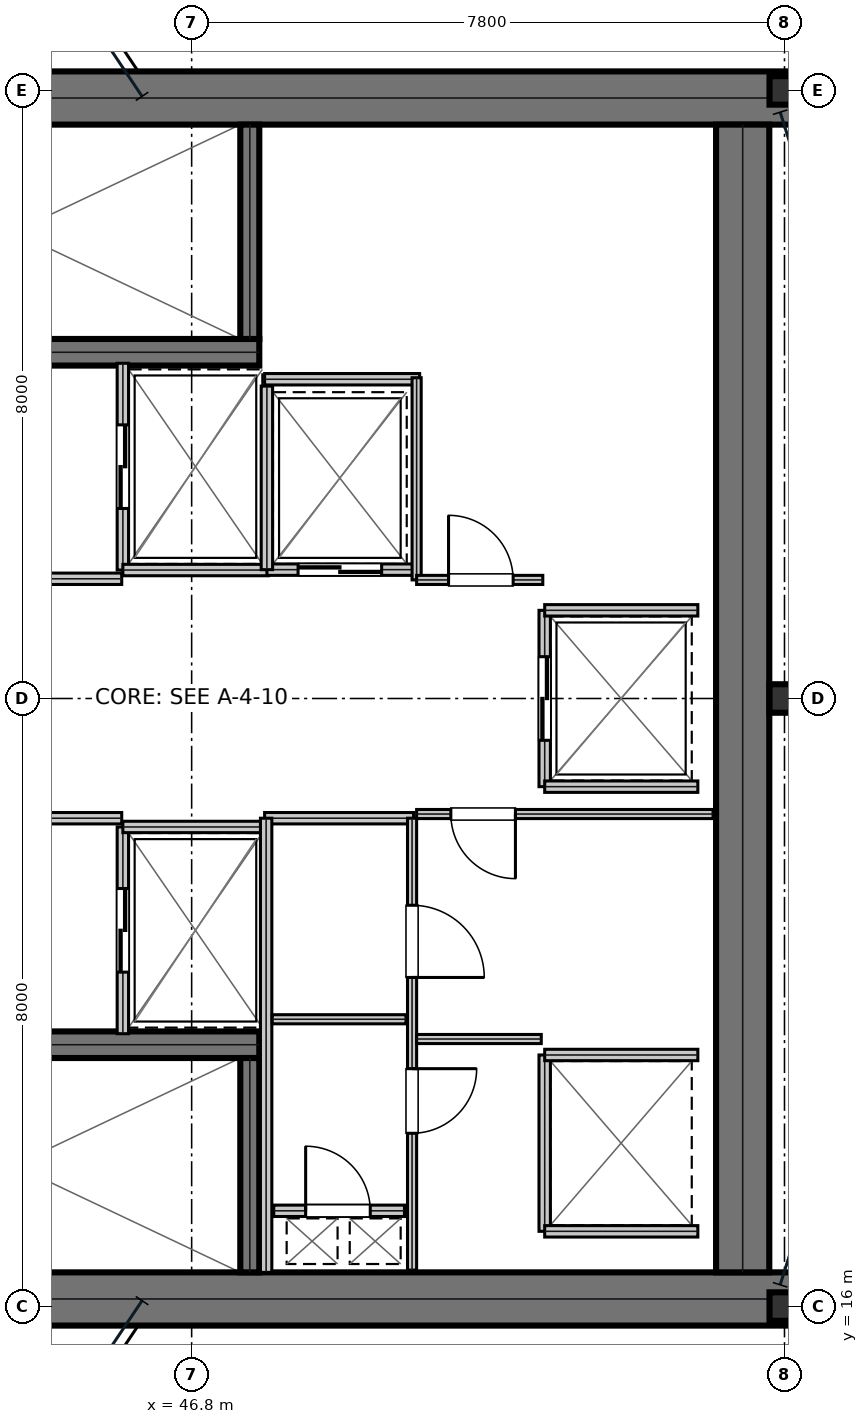
"""IFC4 building model, lengths in metres.
Left out: names, types, materials, properties, quantities, classifications, styles, units other than length and angle.
Written with IfcOpenShell. Run it as: python <this file> out.ifc"""

import sys

from ifc_helpers import new_model, si_unit, direction, frame, frame_2d, origin, origin_2d, place, context, subcontext, project, spatial, rectangle, i_section, extrude, element, fill, save


model = new_model("IFC4")
c1 = context("Model", 3, precision=1e-05, world=origin(), true_north=direction((0.0, 1.0)))
c2 = subcontext(c1, "Body", "Model", "MODEL_VIEW")
j1 = project(units=[si_unit("LENGTHUNIT", "METRE"), si_unit("PLANEANGLEUNIT", "RADIAN")], contexts=[c1])
p1 = place(None, origin())
s1 = spatial("IfcSite", under=j1, at=p1, CompositionType="ELEMENT")
p2 = place(p1, origin())
s2 = spatial("IfcBuilding", under=s1, at=p2, CompositionType="ELEMENT")
p3 = place(p2, frame((0.0, 0.0, 204.0)))
s3 = spatial("IfcBuildingStorey", under=s2, at=p3, CompositionType="ELEMENT", Elevation=204.0)
for number, where, z_axis, x_axis in (
    (1, (38.8, 31.9, 0.0), (0.0, 0.0, 1.0), (1.0, 0.0, 0.0)),
    (2, (38.8, 16.1, 0.0), (0.0, 0.0, 1.0), (1.0, 0.0, 0.0)),
):
    element("IfcWall", number, at=place(p3, frame(where, z_axis=z_axis, x_axis=x_axis)), inside=s3, PredefinedType="SHEAR", context=c2, shape_type="SweptSolid", body=[
        extrude(rectangle(XDim=16.0, YDim=0.7, at=frame_2d((8.0, 0.0))), origin(), (0.0, 0.0, 1.0), 3.79),
    ])
p4 = place(p3, frame((54.05, 16.45, 0.0), z_axis=(0.0, 0.0, 1.0), x_axis=(0.0, 1.0, 0.0)))
e3 = element("IfcWall", 3, at=p4, inside=s3, PredefinedType="SHEAR", context=c2, shape_type="SweptSolid", body=[
    extrude(rectangle(XDim=15.1, YDim=0.7, at=frame_2d((7.55, 0.0))), origin(), (0.0, 0.0, 1.0), 3.79),
])
p5 = place(p3, frame((39.98, 28.555, 0.0), z_axis=(0.0, 0.0, 1.0), x_axis=(1.0, 0.0, 0.0)))
e4 = element("IfcWall", 4, at=p5, inside=s3, PredefinedType="SHEAR", context=c2, shape_type="SweptSolid", body=[
    extrude(rectangle(XDim=7.71, YDim=0.35, at=frame_2d((3.855, 0.0))), origin(), (0.0, 0.0, 1.0), 3.79),
])
p6 = place(p5, frame((0.25, 0.0, 0.0)))
e5 = element("IfcOpeningElement", 5, at=p6, cuts=e4, PredefinedType="OPENING", context=c2, shape_type="SweptSolid", body=[
    extrude(rectangle(XDim=1.1, YDim=2.15, at=frame_2d((0.55, 1.075))), frame((0.0, 0.185, 0.0), z_axis=(0.0, -1.0, 0.0), x_axis=(1.0, 0.0, 0.0)), (0.0, 0.0, 1.0), 0.37),
])
p7 = place(p3, frame((39.98, 19.445, 0.0), z_axis=(0.0, 0.0, 1.0), x_axis=(1.0, 0.0, 0.0)))
e6 = element("IfcWall", 6, at=p7, inside=s3, PredefinedType="SHEAR", context=c2, shape_type="SweptSolid", body=[
    extrude(rectangle(XDim=7.71, YDim=0.35, at=frame_2d((3.855, 0.0))), origin(), (0.0, 0.0, 1.0), 3.79),
])
p8 = place(p7, frame((0.25, 0.0, 0.0)))
e7 = element("IfcOpeningElement", 7, at=p8, cuts=e6, PredefinedType="OPENING", context=c2, shape_type="SweptSolid", body=[
    extrude(rectangle(XDim=1.1, YDim=2.15, at=frame_2d((0.55, 1.075))), frame((0.0, 0.185, 0.0), z_axis=(0.0, -1.0, 0.0), x_axis=(1.0, 0.0, 0.0)), (0.0, 0.0, 1.0), 0.37),
])
for number, where, z_axis, x_axis in (
    (8, (47.565, 28.73, 0.0), (0.0, 0.0, 1.0), (0.0, 1.0, 0.0)),
    (9, (47.565, 16.45, 0.0), (0.0, 0.0, 1.0), (0.0, 1.0, 0.0)),
):
    element("IfcWall", number, at=place(p3, frame(where, z_axis=z_axis, x_axis=x_axis)), inside=s3, PredefinedType="SHEAR", context=c2, shape_type="SweptSolid", body=[
        extrude(rectangle(XDim=2.82, YDim=0.25, at=frame_2d((1.41, 0.0))), origin(), (0.0, 0.0, 1.0), 3.79),
    ])
for number, where, z_axis, x_axis in (
    (10, (54.6, 16.0, 0.0), (0.0, 0.0, 1.0), (1.0, 0.0, 0.0)),
    (11, (54.6, 24.0, 0.0), (0.0, 0.0, 1.0), (1.0, 0.0, 0.0)),
    (12, (54.6, 32.0, 0.0), (0.0, 0.0, 1.0), (1.0, 0.0, 0.0)),
):
    element("IfcColumn", number, at=place(p3, frame(where, z_axis=z_axis, x_axis=x_axis)), inside=s3, PredefinedType="COLUMN", context=c2, shape_type="SweptSolid", body=[
        extrude(i_section(OverallWidth=0.394, OverallDepth=0.375, WebThickness=0.017, FlangeThickness=0.028, at=origin_2d()), origin(), (0.0, 0.0, 1.0), 4.044),
    ])
p9 = place(p3, frame((39.98, 25.575, 0.0), z_axis=(0.0, 0.0, 1.0), x_axis=(1.0, 0.0, 0.0)))
e13 = element("IfcWall", 13, at=p9, inside=s3, PredefinedType="PARTITIONING", context=c2, shape_type="SweptSolid", body=[
    extrude(rectangle(XDim=5.9, YDim=0.15, at=frame_2d((2.95, 0.0))), origin(), (0.0, 0.0, 1.0), 3.79),
])
p10 = place(p9, frame((2.35, 0.0, 0.0)))
e14 = element("IfcOpeningElement", 14, at=p10, cuts=e13, PredefinedType="OPENING", context=c2, shape_type="SweptSolid", body=[
    extrude(rectangle(XDim=1.05, YDim=2.15, at=frame_2d((0.525, 1.075))), frame((0.0, 0.085, 0.0), z_axis=(0.0, -1.0, 0.0), x_axis=(1.0, 0.0, 0.0)), (0.0, 0.0, 1.0), 0.17),
])
p11 = place(p3, frame((39.98, 22.425, 0.0), z_axis=(0.0, 0.0, 1.0), x_axis=(1.0, 0.0, 0.0)))
e15 = element("IfcWall", 15, at=p11, inside=s3, PredefinedType="PARTITIONING", context=c2, shape_type="SweptSolid", body=[
    extrude(rectangle(XDim=5.9, YDim=0.15, at=frame_2d((2.95, 0.0))), origin(), (0.0, 0.0, 1.0), 3.79),
])
p12 = place(p11, frame((2.35, 0.0, 0.0)))
e16 = element("IfcOpeningElement", 16, at=p12, cuts=e15, PredefinedType="OPENING", context=c2, shape_type="SweptSolid", body=[
    extrude(rectangle(XDim=1.05, YDim=2.15, at=frame_2d((0.525, 1.075))), frame((0.0, 0.085, 0.0), z_axis=(0.0, -1.0, 0.0), x_axis=(1.0, 0.0, 0.0)), (0.0, 0.0, 1.0), 0.17),
])
p13 = place(p3, frame((45.895, 25.69, 0.0), z_axis=(0.0, 0.0, 1.0), x_axis=(0.0, 1.0, 0.0)))
e17 = element("IfcWall", 17, at=p13, inside=s3, PredefinedType="PARTITIONING", context=c2, shape_type="SweptSolid", body=[
    extrude(rectangle(XDim=2.72, YDim=0.15, at=frame_2d((1.36, 0.0))), origin(), (0.0, 0.0, 1.0), 3.79),
])
p14 = place(p13, frame((0.81, 0.0, 0.0)))
e18 = element("IfcOpeningElement", 18, at=p14, cuts=e17, PredefinedType="OPENING", context=c2, shape_type="SweptSolid", body=[
    extrude(rectangle(XDim=1.1, YDim=2.15, at=frame_2d((0.55, 1.075))), frame((0.0, 0.085, 0.0), z_axis=(0.0, -1.0, 0.0), x_axis=(1.0, 0.0, 0.0)), (0.0, 0.0, 1.0), 0.17),
])
p15 = place(p3, frame((45.895, 25.69, 0.0), z_axis=(0.0, 0.0, 1.0), x_axis=(1.0, 0.0, 0.0)))
e19 = element("IfcWall", 19, at=p15, inside=s3, PredefinedType="PARTITIONING", context=c2, shape_type="SweptSolid", body=[
    extrude(rectangle(XDim=1.915, YDim=0.15, at=frame_2d((0.958, 0.0))), origin(), (0.0, 0.0, 1.0), 3.79),
])
p16 = place(p3, frame((45.895, 19.59, 0.0), z_axis=(0.0, 0.0, 1.0), x_axis=(0.0, 1.0, 0.0)))
e20 = element("IfcWall", 20, at=p16, inside=s3, PredefinedType="PARTITIONING", context=c2, shape_type="SweptSolid", body=[
    extrude(rectangle(XDim=2.72, YDim=0.15, at=frame_2d((1.36, 0.0))), origin(), (0.0, 0.0, 1.0), 3.79),
])
p17 = place(p16, frame((0.81, 0.0, 0.0)))
e21 = element("IfcOpeningElement", 21, at=p17, cuts=e20, PredefinedType="OPENING", context=c2, shape_type="SweptSolid", body=[
    extrude(rectangle(XDim=1.1, YDim=2.15, at=frame_2d((0.55, 1.075))), frame((0.0, 0.085, 0.0), z_axis=(0.0, -1.0, 0.0), x_axis=(1.0, 0.0, 0.0)), (0.0, 0.0, 1.0), 0.17),
])
p18 = place(p3, frame((45.895, 22.31, 0.0), z_axis=(0.0, 0.0, 1.0), x_axis=(1.0, 0.0, 0.0)))
e22 = element("IfcWall", 22, at=p18, inside=s3, PredefinedType="PARTITIONING", context=c2, shape_type="SweptSolid", body=[
    extrude(rectangle(XDim=1.915, YDim=0.15, at=frame_2d((0.958, 0.0))), origin(), (0.0, 0.0, 1.0), 3.79),
])
p19 = place(p3, frame((47.79, 25.695, 0.0), z_axis=(0.0, 0.0, 1.0), x_axis=(1.0, 0.0, 0.0)))
e23 = element("IfcWall", 23, at=p19, inside=s3, PredefinedType="PARTITIONING", context=c2, shape_type="SweptSolid", body=[
    extrude(rectangle(XDim=1.92, YDim=0.15, at=frame_2d((0.96, 0.0))), origin(), (0.0, 0.0, 1.0), 3.79),
])
p20 = place(p19, frame((0.41, 0.0, 0.0)))
e24 = element("IfcOpeningElement", 24, at=p20, cuts=e23, PredefinedType="OPENING", context=c2, shape_type="SweptSolid", body=[
    extrude(rectangle(XDim=1.1, YDim=2.15, at=frame_2d((0.55, 1.075))), frame((0.0, 0.085, 0.0), z_axis=(0.0, -1.0, 0.0), x_axis=(1.0, 0.0, 0.0)), (0.0, 0.0, 1.0), 0.17),
])
p21 = place(p3, frame((47.79, 25.695, 0.0), z_axis=(0.0, 0.0, 1.0), x_axis=(0.0, 1.0, 0.0)))
e25 = element("IfcWall", 25, at=p21, inside=s3, PredefinedType="PARTITIONING", context=c2, shape_type="SweptSolid", body=[
    extrude(rectangle(XDim=2.415, YDim=0.15, at=frame_2d((1.208, 0.0))), origin(), (0.0, 0.0, 1.0), 3.79),
])
p22 = place(p3, frame((51.445, 22.84, 0.0), z_axis=(0.0, 0.0, 1.0), x_axis=(0.0, 1.0, 0.0)))
e26 = element("IfcWall", 26, at=p22, inside=s3, PredefinedType="PARTITIONING", context=c2, shape_type="SweptSolid", body=[
    extrude(rectangle(XDim=2.32, YDim=0.15, at=frame_2d((1.16, 0.0))), origin(), (0.0, 0.0, 1.0), 3.79),
])
p23 = place(p22, frame((0.61, 0.0, 0.0)))
e27 = element("IfcOpeningElement", 27, at=p23, cuts=e26, PredefinedType="OPENING", context=c2, shape_type="SweptSolid", body=[
    extrude(rectangle(XDim=1.1, YDim=2.15, at=frame_2d((0.55, 1.075))), frame((0.0, 0.085, 0.0), z_axis=(0.0, -1.0, 0.0), x_axis=(1.0, 0.0, 0.0)), (0.0, 0.0, 1.0), 0.17),
])
for number, where, z_axis, x_axis in (
    (28, (51.445, 22.84, 0.0), (0.0, 0.0, 1.0), (1.0, 0.0, 0.0)),
    (29, (51.445, 25.16, 0.0), (0.0, 0.0, 1.0), (1.0, 0.0, 0.0)),
):
    element("IfcWall", number, at=place(p3, frame(where, z_axis=z_axis, x_axis=x_axis)), inside=s3, PredefinedType="PARTITIONING", context=c2, shape_type="SweptSolid", body=[
        extrude(rectangle(XDim=2.015, YDim=0.15, at=frame_2d((1.007, 0.0))), origin(), (0.0, 0.0, 1.0), 3.79),
    ])
p24 = place(p3, frame((51.445, 16.99, 0.0), z_axis=(0.0, 0.0, 1.0), x_axis=(0.0, 1.0, 0.0)))
e30 = element("IfcWall", 30, at=p24, inside=s3, PredefinedType="PARTITIONING", context=c2, shape_type="SweptSolid", body=[
    extrude(rectangle(XDim=2.32, YDim=0.15, at=frame_2d((1.16, 0.0))), origin(), (0.0, 0.0, 1.0), 3.79),
])
for number, where, z_axis, x_axis in (
    (31, (51.445, 16.99, 0.0), (0.0, 0.0, 1.0), (1.0, 0.0, 0.0)),
    (32, (51.445, 19.31, 0.0), (0.0, 0.0, 1.0), (1.0, 0.0, 0.0)),
):
    element("IfcWall", number, at=place(p3, frame(where, z_axis=z_axis, x_axis=x_axis)), inside=s3, PredefinedType="PARTITIONING", context=c2, shape_type="SweptSolid", body=[
        extrude(rectangle(XDim=2.015, YDim=0.15, at=frame_2d((1.007, 0.0))), origin(), (0.0, 0.0, 1.0), 3.79),
    ])
p25 = place(p3, frame((47.88, 17.26, 0.0), z_axis=(0.0, 0.0, 1.0), x_axis=(1.0, 0.0, 0.0)))
e33 = element("IfcWall", 33, at=p25, inside=s3, PredefinedType="PARTITIONING", context=c2, shape_type="SweptSolid", body=[
    extrude(rectangle(XDim=1.72, YDim=0.15, at=frame_2d((0.86, 0.0))), origin(), (0.0, 0.0, 1.0), 3.79),
])
p26 = place(p25, frame((0.42, 0.0, 0.0)))
e34 = element("IfcOpeningElement", 34, at=p26, cuts=e33, PredefinedType="OPENING", context=c2, shape_type="SweptSolid", body=[
    extrude(rectangle(XDim=0.85, YDim=2.15, at=frame_2d((0.425, 1.075))), frame((0.0, 0.085, 0.0), z_axis=(0.0, -1.0, 0.0), x_axis=(1.0, 0.0, 0.0)), (0.0, 0.0, 1.0), 0.17),
])
p27 = place(p3, frame((47.76, 22.425, 0.0), z_axis=(0.0, 0.0, 1.0), x_axis=(1.0, 0.0, 0.0)))
e35 = element("IfcWall", 35, at=p27, inside=s3, PredefinedType="PARTITIONING", context=c2, shape_type="SweptSolid", body=[
    extrude(rectangle(XDim=1.96, YDim=0.15, at=frame_2d((0.98, 0.0))), origin(), (0.0, 0.0, 1.0), 3.79),
])
p28 = place(p3, frame((47.78, 16.45, 0.0), z_axis=(0.0, 0.0, 1.0), x_axis=(0.0, 1.0, 0.0)))
e36 = element("IfcWall", 36, at=p28, inside=s3, PredefinedType="PARTITIONING", context=c2, shape_type="SweptSolid", body=[
    extrude(rectangle(XDim=5.975, YDim=0.15, at=frame_2d((2.988, 0.0))), origin(), (0.0, 0.0, 1.0), 3.79),
])
p29 = place(p3, frame((47.86, 19.78, 0.0), z_axis=(0.0, 0.0, 1.0), x_axis=(1.0, 0.0, 0.0)))
e37 = element("IfcWall", 37, at=p29, inside=s3, PredefinedType="PARTITIONING", context=c2, shape_type="SweptSolid", body=[
    extrude(rectangle(XDim=1.76, YDim=0.12, at=frame_2d((0.88, 0.0))), origin(), (0.0, 0.0, 1.0), 3.79),
])
p30 = place(p3, frame((49.7, 16.48, 0.0), z_axis=(0.0, 0.0, 1.0), x_axis=(0.0, 1.0, 0.0)))
e38 = element("IfcWall", 38, at=p30, inside=s3, PredefinedType="PARTITIONING", context=c2, shape_type="SweptSolid", body=[
    extrude(rectangle(XDim=5.945, YDim=0.12, at=frame_2d((2.973, 0.0))), origin(), (0.0, 0.0, 1.0), 3.79),
])
p31 = place(p30, frame((1.8, 0.0, 0.0)))
e39 = element("IfcOpeningElement", 39, at=p31, cuts=e38, PredefinedType="OPENING", context=c2, shape_type="SweptSolid", body=[
    extrude(rectangle(XDim=0.85, YDim=2.15, at=frame_2d((0.425, 1.075))), frame((0.0, 0.07, 0.0), z_axis=(0.0, -1.0, 0.0), x_axis=(1.0, 0.0, 0.0)), (0.0, 0.0, 1.0), 0.14),
])
p32 = place(p30, frame((3.85, 0.0, 0.0)))
e40 = element("IfcOpeningElement", 40, at=p32, cuts=e38, PredefinedType="OPENING", context=c2, shape_type="SweptSolid", body=[
    extrude(rectangle(XDim=0.95, YDim=2.15, at=frame_2d((0.475, 1.075))), frame((0.0, 0.07, 0.0), z_axis=(0.0, -1.0, 0.0), x_axis=(1.0, 0.0, 0.0)), (0.0, 0.0, 1.0), 0.14),
])
p33 = place(p3, frame((49.76, 22.48, 0.0), z_axis=(0.0, 0.0, 1.0), x_axis=(1.0, 0.0, 0.0)))
e41 = element("IfcWall", 41, at=p33, inside=s3, PredefinedType="PARTITIONING", context=c2, shape_type="SweptSolid", body=[
    extrude(rectangle(XDim=3.9, YDim=0.12, at=frame_2d((1.95, 0.0))), origin(), (0.0, 0.0, 1.0), 3.79),
])
p34 = place(p33, frame((0.45, 0.0, 0.0)))
e42 = element("IfcOpeningElement", 42, at=p34, cuts=e41, PredefinedType="OPENING", context=c2, shape_type="SweptSolid", body=[
    extrude(rectangle(XDim=0.85, YDim=2.15, at=frame_2d((0.425, 1.075))), frame((0.0, 0.07, 0.0), z_axis=(0.0, -1.0, 0.0), x_axis=(1.0, 0.0, 0.0)), (0.0, 0.0, 1.0), 0.14),
])
p35 = place(p3, frame((49.76, 19.52, 0.0), z_axis=(0.0, 0.0, 1.0), x_axis=(1.0, 0.0, 0.0)))
e43 = element("IfcWall", 43, at=p35, inside=s3, PredefinedType="PARTITIONING", context=c2, shape_type="SweptSolid", body=[
    extrude(rectangle(XDim=1.64, YDim=0.12, at=frame_2d((0.82, 0.0))), origin(), (0.0, 0.0, 1.0), 3.79),
])
p36 = place(p3, frame((47.76, 28.2, 0.0), z_axis=(0.0, 0.0, 1.0), x_axis=(1.0, 0.0, 0.0)))
e44 = element("IfcWall", 44, at=p36, inside=s3, PredefinedType="PARTITIONING", context=c2, shape_type="SweptSolid", body=[
    extrude(rectangle(XDim=2.04, YDim=0.15, at=frame_2d((1.02, 0.0))), origin(), (0.0, 0.0, 1.0), 3.79),
])
p37 = place(p3, frame((49.76, 25.56, 0.0), z_axis=(0.0, 0.0, 1.0), x_axis=(0.0, 1.0, 0.0)))
e45 = element("IfcWall", 45, at=p37, inside=s3, PredefinedType="PARTITIONING", context=c2, shape_type="SweptSolid", body=[
    extrude(rectangle(XDim=2.66, YDim=0.12, at=frame_2d((1.33, 0.0))), origin(), (0.0, 0.0, 1.0), 3.79),
])
p38 = place(p3, frame((49.76, 25.56, 0.0), z_axis=(0.0, 0.0, 1.0), x_axis=(1.0, 0.0, 0.0)))
e46 = element("IfcWall", 46, at=p38, inside=s3, PredefinedType="PARTITIONING", context=c2, shape_type="SweptSolid", body=[
    extrude(rectangle(XDim=1.66, YDim=0.12, at=frame_2d((0.83, 0.0))), origin(), (0.0, 0.0, 1.0), 3.79),
])
p39 = place(p38, frame((0.42, 0.0, 0.0)))
e47 = element("IfcOpeningElement", 47, at=p39, cuts=e46, PredefinedType="OPENING", context=c2, shape_type="SweptSolid", body=[
    extrude(rectangle(XDim=0.85, YDim=2.15, at=frame_2d((0.425, 1.075))), frame((0.0, 0.07, 0.0), z_axis=(0.0, -1.0, 0.0), x_axis=(1.0, 0.0, 0.0)), (0.0, 0.0, 1.0), 0.14),
])
p40 = place(p14, frame((1.1, 0.0, 0.0), z_axis=(0.0, 0.0, 1.0), x_axis=(-1.0, 0.0, 0.0)))
e48 = element("IfcDoor", 48, at=p40, inside=s3, OperationType="DOUBLE_DOOR_SLIDING", PredefinedType="DOOR", context=c2, shape_type="SweptSolid", body=[
    extrude(rectangle(XDim=1.1, YDim=2.15, at=frame_2d((0.55, 1.075))), frame((0.0, 0.025, 0.0), z_axis=(0.0, -1.0, 0.0), x_axis=(1.0, 0.0, 0.0)), (0.0, 0.0, 1.0), 0.05),
])
fill(e18, e48)
p41 = place(p17, frame((1.1, 0.0, 0.0), z_axis=(0.0, 0.0, 1.0), x_axis=(-1.0, 0.0, 0.0)))
e49 = element("IfcDoor", 49, at=p41, inside=s3, OperationType="DOUBLE_DOOR_SLIDING", PredefinedType="DOOR", context=c2, shape_type="SweptSolid", body=[
    extrude(rectangle(XDim=1.1, YDim=2.15, at=frame_2d((0.55, 1.075))), frame((0.0, 0.025, 0.0), z_axis=(0.0, -1.0, 0.0), x_axis=(1.0, 0.0, 0.0)), (0.0, 0.0, 1.0), 0.05),
])
fill(e21, e49)
p42 = place(p20, frame((1.1, 0.0, 0.0), z_axis=(0.0, 0.0, 1.0), x_axis=(-1.0, 0.0, 0.0)))
e50 = element("IfcDoor", 50, at=p42, inside=s3, OperationType="DOUBLE_DOOR_SLIDING", PredefinedType="DOOR", context=c2, shape_type="SweptSolid", body=[
    extrude(rectangle(XDim=1.1, YDim=2.15, at=frame_2d((0.55, 1.075))), frame((0.0, 0.025, 0.0), z_axis=(0.0, -1.0, 0.0), x_axis=(1.0, 0.0, 0.0)), (0.0, 0.0, 1.0), 0.05),
])
fill(e24, e50)
p43 = place(p23, frame((1.1, 0.0, 0.0), z_axis=(0.0, 0.0, 1.0), x_axis=(-1.0, 0.0, 0.0)))
e51 = element("IfcDoor", 51, at=p43, inside=s3, OperationType="DOUBLE_DOOR_SLIDING", PredefinedType="DOOR", context=c2, shape_type="SweptSolid", body=[
    extrude(rectangle(XDim=1.1, YDim=2.15, at=frame_2d((0.55, 1.075))), frame((0.0, 0.025, 0.0), z_axis=(0.0, -1.0, 0.0), x_axis=(1.0, 0.0, 0.0)), (0.0, 0.0, 1.0), 0.05),
])
fill(e27, e51)
p44 = place(p26, origin())
e52 = element("IfcDoor", 52, at=p44, inside=s3, OperationType="SINGLE_SWING_LEFT", PredefinedType="TRAPDOOR", context=c2, shape_type="SweptSolid", body=[
    extrude(rectangle(XDim=0.85, YDim=2.15, at=frame_2d((0.425, 1.075))), frame((0.0, 0.025, 0.0), z_axis=(0.0, -1.0, 0.0), x_axis=(1.0, 0.0, 0.0)), (0.0, 0.0, 1.0), 0.05),
])
fill(e34, e52)
p45 = place(p31, frame((0.85, 0.0, 0.0), z_axis=(0.0, 0.0, 1.0), x_axis=(-1.0, 0.0, 0.0)))
e53 = element("IfcDoor", 53, at=p45, inside=s3, OperationType="SINGLE_SWING_LEFT", PredefinedType="DOOR", context=c2, shape_type="SweptSolid", body=[
    extrude(rectangle(XDim=0.85, YDim=2.15, at=frame_2d((0.425, 1.075))), frame((0.0, 0.025, 0.0), z_axis=(0.0, -1.0, 0.0), x_axis=(1.0, 0.0, 0.0)), (0.0, 0.0, 1.0), 0.05),
])
fill(e39, e53)
p46 = place(p32, frame((0.95, 0.0, 0.0), z_axis=(0.0, 0.0, 1.0), x_axis=(-1.0, 0.0, 0.0)))
e54 = element("IfcDoor", 54, at=p46, inside=s3, OperationType="SINGLE_SWING_RIGHT", PredefinedType="DOOR", context=c2, shape_type="SweptSolid", body=[
    extrude(rectangle(XDim=0.95, YDim=2.15, at=frame_2d((0.475, 1.075))), frame((0.0, 0.025, 0.0), z_axis=(0.0, -1.0, 0.0), x_axis=(1.0, 0.0, 0.0)), (0.0, 0.0, 1.0), 0.05),
])
fill(e40, e54)
p47 = place(p34, frame((0.85, 0.0, 0.0), z_axis=(0.0, 0.0, 1.0), x_axis=(-1.0, 0.0, 0.0)))
e55 = element("IfcDoor", 55, at=p47, inside=s3, OperationType="SINGLE_SWING_LEFT", PredefinedType="DOOR", context=c2, shape_type="SweptSolid", body=[
    extrude(rectangle(XDim=0.85, YDim=2.15, at=frame_2d((0.425, 1.075))), frame((0.0, 0.025, 0.0), z_axis=(0.0, -1.0, 0.0), x_axis=(1.0, 0.0, 0.0)), (0.0, 0.0, 1.0), 0.05),
])
fill(e42, e55)
p48 = place(p39, origin())
e56 = element("IfcDoor", 56, at=p48, inside=s3, OperationType="SINGLE_SWING_LEFT", PredefinedType="DOOR", context=c2, shape_type="SweptSolid", body=[
    extrude(rectangle(XDim=0.85, YDim=2.15, at=frame_2d((0.425, 1.075))), frame((0.0, 0.025, 0.0), z_axis=(0.0, -1.0, 0.0), x_axis=(1.0, 0.0, 0.0)), (0.0, 0.0, 1.0), 0.05),
])
fill(e47, e56)
save(model, sys.argv[1])
